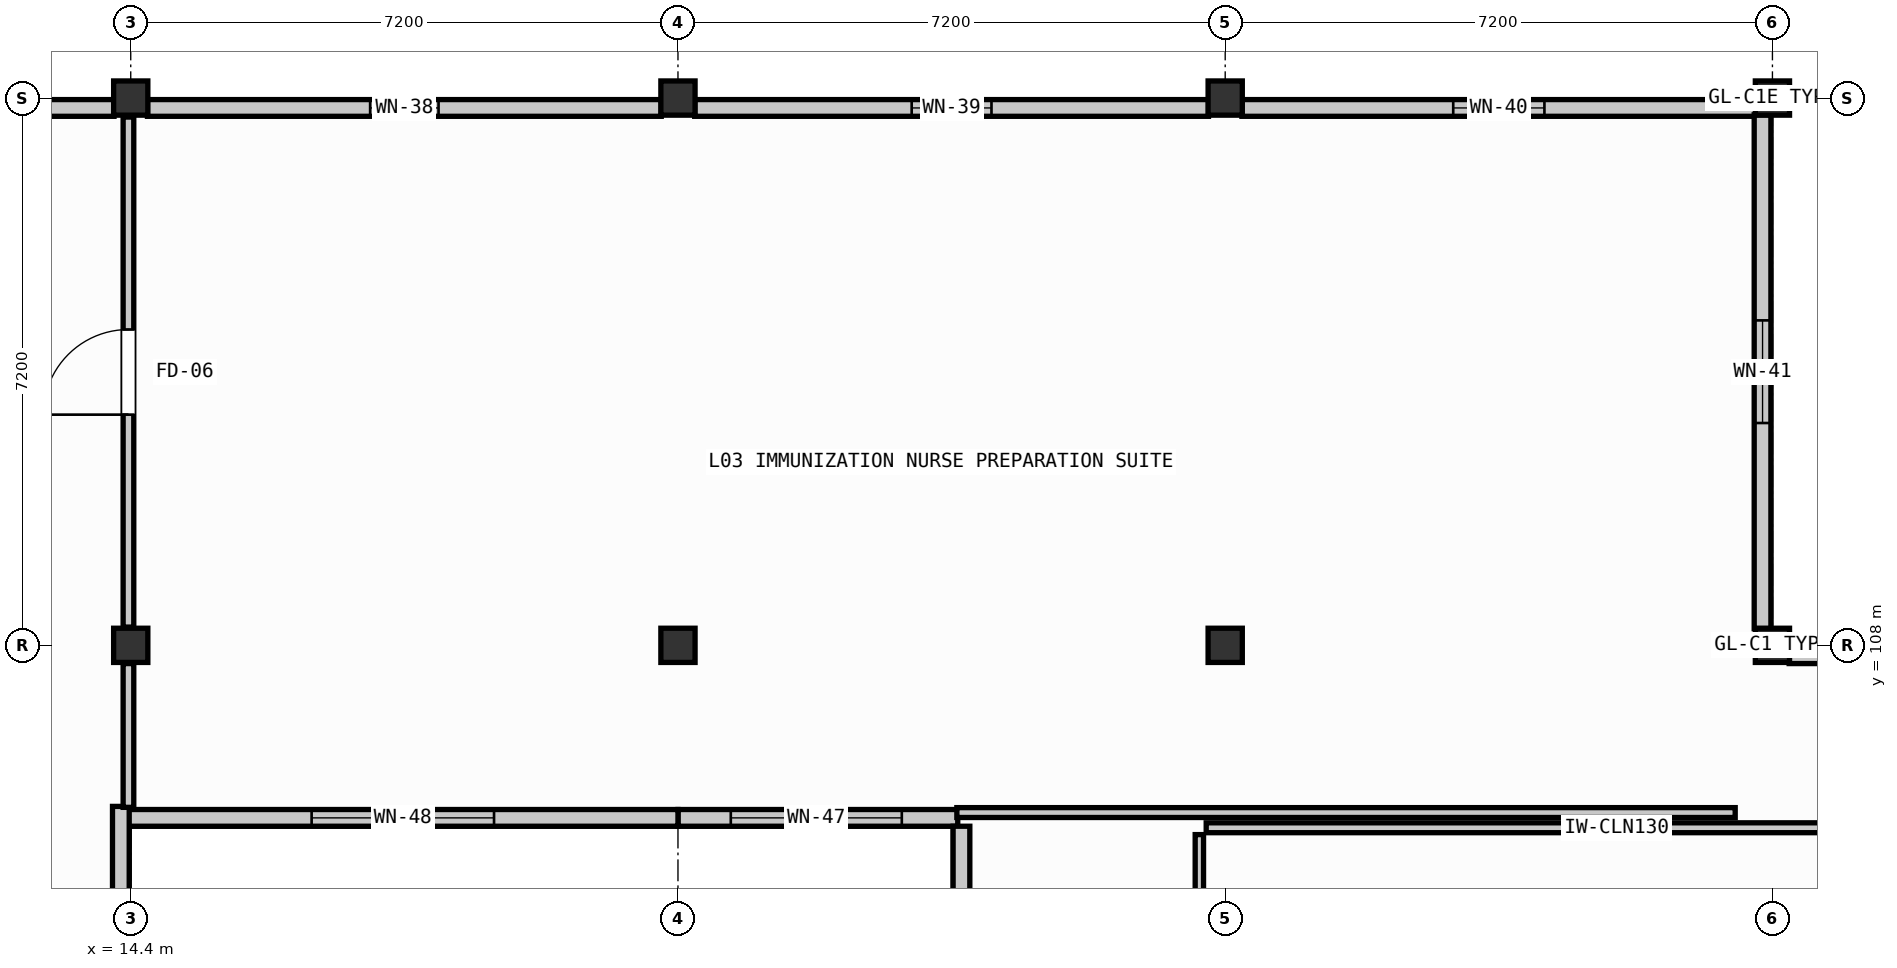
"""IFC4 building model, lengths in metres.
Left out: names, types, materials, properties, quantities, classifications, styles, units other than length and angle.
Written with IfcOpenShell. Run it as: python <this file> out.ifc"""

import sys

from ifc_helpers import new_model, si_unit, direction, frame, frame_2d, origin, origin_2d, place, context, subcontext, project, spatial, rectangle, extrude, element, fill, save


model = new_model("IFC4")
c1 = context("Model", 3, precision=1e-05, world=origin(), true_north=direction((0.0, 1.0)))
c2 = subcontext(c1, "Body", "Model", "MODEL_VIEW")
j1 = project(units=[si_unit("LENGTHUNIT", "METRE"), si_unit("PLANEANGLEUNIT", "RADIAN")], contexts=[c1])
p1 = place(None, origin())
s1 = spatial("IfcSite", under=j1, at=p1, CompositionType="ELEMENT")
p2 = place(p1, origin())
s2 = spatial("IfcBuilding", under=s1, at=p2, CompositionType="ELEMENT")
p3 = place(p2, frame((0.0, 0.0, 9.3)))
s3 = spatial("IfcBuildingStorey", under=s2, at=p3, CompositionType="ELEMENT", Elevation=9.3)
for number, where, z_axis, x_axis in (
    (1, (14.4, 108.0, 0.0), (0.0, 0.0, 1.0), (1.0, 0.0, 0.0)),
    (2, (14.4, 115.2, 0.0), (0.0, 0.0, 1.0), (1.0, 0.0, 0.0)),
    (3, (21.6, 108.0, 0.0), (0.0, 0.0, 1.0), (1.0, 0.0, 0.0)),
    (4, (21.6, 115.2, 0.0), (0.0, 0.0, 1.0), (1.0, 0.0, 0.0)),
    (5, (28.8, 108.0, 0.0), (0.0, 0.0, 1.0), (1.0, 0.0, 0.0)),
    (6, (28.8, 115.2, 0.0), (0.0, 0.0, 1.0), (1.0, 0.0, 0.0)),
    (7, (36.0, 108.0, 0.0), (0.0, 0.0, 1.0), (1.0, 0.0, 0.0)),
    (8, (36.0, 115.2, 0.0), (0.0, 0.0, 1.0), (1.0, 0.0, 0.0)),
):
    element("IfcColumn", number, at=place(p3, frame(where, z_axis=z_axis, x_axis=x_axis)), inside=s3, PredefinedType="COLUMN", context=c2, shape_type="SweptSolid", body=[
        extrude(rectangle(XDim=0.45, YDim=0.45, at=origin_2d()), origin(), (0.0, 0.0, 1.0), 3.99),
    ])
p4 = place(p3, frame((7.42, 115.07, 0.0), z_axis=(0.0, 0.0, 1.0), x_axis=(1.0, 0.0, 0.0)))
e9 = element("IfcWall", 9, at=p4, inside=s3, PredefinedType="SOLIDWALL", context=c2, shape_type="SweptSolid", body=[
    extrude(rectangle(XDim=6.76, YDim=0.22, at=frame_2d((3.38, 0.0))), origin(), (0.0, 0.0, 1.0), 3.35),
])
p5 = place(p4, frame((3.005, 0.0, 0.95)))
e10 = element("IfcOpeningElement", 10, at=p5, cuts=e9, PredefinedType="OPENING", context=c2, shape_type="SweptSolid", body=[
    extrude(rectangle(XDim=0.75, YDim=1.55, at=frame_2d((0.375, 0.775))), frame((0.0, 0.12, 0.0), z_axis=(0.0, -1.0, 0.0), x_axis=(1.0, 0.0, 0.0)), (0.0, 0.0, 1.0), 0.24),
])
p6 = place(p3, frame((14.62, 115.07, 0.0), z_axis=(0.0, 0.0, 1.0), x_axis=(1.0, 0.0, 0.0)))
e11 = element("IfcWall", 11, at=p6, inside=s3, PredefinedType="SOLIDWALL", context=c2, shape_type="SweptSolid", body=[
    extrude(rectangle(XDim=6.76, YDim=0.22, at=frame_2d((3.38, 0.0))), origin(), (0.0, 0.0, 1.0), 3.35),
])
p7 = place(p6, frame((2.93, 0.0, 0.95)))
e12 = element("IfcOpeningElement", 12, at=p7, cuts=e11, PredefinedType="OPENING", context=c2, shape_type="SweptSolid", body=[
    extrude(rectangle(XDim=0.9, YDim=1.55, at=frame_2d((0.45, 0.775))), frame((0.0, 0.12, 0.0), z_axis=(0.0, -1.0, 0.0), x_axis=(1.0, 0.0, 0.0)), (0.0, 0.0, 1.0), 0.24),
])
p8 = place(p3, frame((21.82, 115.07, 0.0), z_axis=(0.0, 0.0, 1.0), x_axis=(1.0, 0.0, 0.0)))
e13 = element("IfcWall", 13, at=p8, inside=s3, PredefinedType="SOLIDWALL", context=c2, shape_type="SweptSolid", body=[
    extrude(rectangle(XDim=6.76, YDim=0.22, at=frame_2d((3.38, 0.0))), origin(), (0.0, 0.0, 1.0), 3.35),
])
p9 = place(p8, frame((2.855, 0.0, 0.95)))
e14 = element("IfcOpeningElement", 14, at=p9, cuts=e13, PredefinedType="OPENING", context=c2, shape_type="SweptSolid", body=[
    extrude(rectangle(XDim=1.05, YDim=1.55, at=frame_2d((0.525, 0.775))), frame((0.0, 0.12, 0.0), z_axis=(0.0, -1.0, 0.0), x_axis=(1.0, 0.0, 0.0)), (0.0, 0.0, 1.0), 0.24),
])
p10 = place(p3, frame((29.02, 115.07, 0.0), z_axis=(0.0, 0.0, 1.0), x_axis=(1.0, 0.0, 0.0)))
e15 = element("IfcWall", 15, at=p10, inside=s3, PredefinedType="SOLIDWALL", context=c2, shape_type="SweptSolid", body=[
    extrude(rectangle(XDim=6.76, YDim=0.22, at=frame_2d((3.38, 0.0))), origin(), (0.0, 0.0, 1.0), 3.35),
])
p11 = place(p10, frame((2.78, 0.0, 0.95)))
e16 = element("IfcOpeningElement", 16, at=p11, cuts=e15, PredefinedType="OPENING", context=c2, shape_type="SweptSolid", body=[
    extrude(rectangle(XDim=1.2, YDim=1.55, at=frame_2d((0.6, 0.775))), frame((0.0, 0.12, 0.0), z_axis=(0.0, -1.0, 0.0), x_axis=(1.0, 0.0, 0.0)), (0.0, 0.0, 1.0), 0.24),
])
p12 = place(p3, frame((35.87, 114.98, 0.0), z_axis=(0.0, 0.0, 1.0), x_axis=(0.0, -1.0, 0.0)))
e17 = element("IfcWall", 17, at=p12, inside=s3, PredefinedType="SOLIDWALL", context=c2, shape_type="SweptSolid", body=[
    extrude(rectangle(XDim=6.76, YDim=0.22, at=frame_2d((3.38, 0.0))), origin(), (0.0, 0.0, 1.0), 3.27),
])
p13 = place(p12, frame((2.705, 0.0, 0.95)))
e18 = element("IfcOpeningElement", 18, at=p13, cuts=e17, PredefinedType="OPENING", context=c2, shape_type="SweptSolid", body=[
    extrude(rectangle(XDim=1.35, YDim=1.55, at=frame_2d((0.675, 0.775))), frame((0.0, 0.12, 0.0), z_axis=(0.0, -1.0, 0.0), x_axis=(1.0, 0.0, 0.0)), (0.0, 0.0, 1.0), 0.24),
])
p14 = place(p3, frame((36.22, 107.87, 0.0), z_axis=(0.0, 0.0, 1.0), x_axis=(1.0, 0.0, 0.0)))
e19 = element("IfcWall", 19, at=p14, inside=s3, PredefinedType="SOLIDWALL", context=c2, shape_type="SweptSolid", body=[
    extrude(rectangle(XDim=3.42, YDim=0.22, at=frame_2d((1.71, 0.0))), origin(), (0.0, 0.0, 1.0), 3.35),
])
p15 = place(p14, frame((0.96, 0.0, 0.95)))
e20 = element("IfcOpeningElement", 20, at=p15, cuts=e19, PredefinedType="OPENING", context=c2, shape_type="SweptSolid", body=[
    extrude(rectangle(XDim=1.5, YDim=1.55, at=frame_2d((0.75, 0.775))), frame((0.0, 0.12, 0.0), z_axis=(0.0, -1.0, 0.0), x_axis=(1.0, 0.0, 0.0)), (0.0, 0.0, 1.0), 0.24),
])
p16 = place(p3, frame((25.281, 105.73, 0.0), z_axis=(0.0, 0.0, 1.0), x_axis=(-1.0, 0.0, 0.0)))
e21 = element("IfcWall", 21, at=p16, inside=s3, PredefinedType="SOLIDWALL", context=c2, shape_type="SweptSolid", body=[
    extrude(rectangle(XDim=3.681, YDim=0.22, at=frame_2d((1.84, 0.0))), origin(), (0.0, 0.0, 1.0), 3.97),
])
p17 = place(p16, frame((0.736, 0.0, 0.95)))
e22 = element("IfcOpeningElement", 22, at=p17, cuts=e21, PredefinedType="OPENING", context=c2, shape_type="SweptSolid", body=[
    extrude(rectangle(XDim=2.25, YDim=1.55, at=frame_2d((1.125, 0.775))), frame((0.0, 0.12, 0.0), z_axis=(0.0, -1.0, 0.0), x_axis=(1.0, 0.0, 0.0)), (0.0, 0.0, 1.0), 0.24),
])
p18 = place(p3, frame((21.6, 105.73, 0.0), z_axis=(0.0, 0.0, 1.0), x_axis=(-1.0, 0.0, 0.0)))
e23 = element("IfcWall", 23, at=p18, inside=s3, PredefinedType="SOLIDWALL", context=c2, shape_type="SweptSolid", body=[
    extrude(rectangle(XDim=7.24, YDim=0.22, at=frame_2d((3.62, 0.0))), origin(), (0.0, 0.0, 1.0), 3.35),
])
p19 = place(p18, frame((2.42, 0.0, 0.95)))
e24 = element("IfcOpeningElement", 24, at=p19, cuts=e23, PredefinedType="OPENING", context=c2, shape_type="SweptSolid", body=[
    extrude(rectangle(XDim=2.4, YDim=1.55, at=frame_2d((1.2, 0.775))), frame((0.0, 0.12, 0.0), z_axis=(0.0, -1.0, 0.0), x_axis=(1.0, 0.0, 0.0)), (0.0, 0.0, 1.0), 0.24),
])
p20 = place(p3, frame((14.27, 105.881, 0.0), z_axis=(0.0, 0.0, 1.0), x_axis=(0.0, -1.0, 0.0)))
e25 = element("IfcWall", 25, at=p20, inside=s3, PredefinedType="SOLIDWALL", context=c2, shape_type="SweptSolid", body=[
    extrude(rectangle(XDim=4.861, YDim=0.22, at=frame_2d((2.431, 0.0))), origin(), (0.0, 0.0, 1.0), 3.27),
])
p21 = place(p20, frame((2.736, 0.0, 0.95)))
e26 = element("IfcOpeningElement", 26, at=p21, cuts=e25, PredefinedType="OPENING", context=c2, shape_type="SweptSolid", body=[
    extrude(rectangle(XDim=0.75, YDim=1.85, at=frame_2d((0.375, 0.925))), frame((0.0, 0.12, 0.0), z_axis=(0.0, -1.0, 0.0), x_axis=(1.0, 0.0, 0.0)), (0.0, 0.0, 1.0), 0.24),
])
p22 = place(p3, frame((25.33, 100.8, 0.0), z_axis=(0.0, 0.0, 1.0), x_axis=(0.0, 1.0, 0.0)))
e27 = element("IfcWall", 27, at=p22, inside=s3, PredefinedType="SOLIDWALL", context=c2, shape_type="SweptSolid", body=[
    extrude(rectangle(XDim=4.82, YDim=0.22, at=frame_2d((2.41, 0.0))), origin(), (0.0, 0.0, 1.0), 3.97),
])
p23 = place(p22, frame((1.81, 0.0, 0.95)))
e28 = element("IfcOpeningElement", 28, at=p23, cuts=e27, PredefinedType="OPENING", context=c2, shape_type="SweptSolid", body=[
    extrude(rectangle(XDim=1.2, YDim=1.85, at=frame_2d((0.6, 0.925))), frame((0.0, 0.12, 0.0), z_axis=(0.0, -1.0, 0.0), x_axis=(1.0, 0.0, 0.0)), (0.0, 0.0, 1.0), 0.24),
])
p24 = place(p3, frame((28.55, 105.6, 0.0), z_axis=(0.0, 0.0, 1.0), x_axis=(1.0, 0.0, 0.0)))
e29 = element("IfcWall", 29, at=p24, inside=s3, PredefinedType="PARTITIONING", context=c2, shape_type="SweptSolid", body=[
    extrude(rectangle(XDim=10.8, YDim=0.13, at=frame_2d((5.4, 0.0))), origin(), (0.0, 0.0, 1.0), 3.35),
])
p25 = place(p3, frame((28.46, 88.1, 0.0), z_axis=(0.0, 0.0, 1.0), x_axis=(0.0, 1.0, 0.0)))
e30 = element("IfcWall", 30, at=p25, inside=s3, PredefinedType="PARTITIONING", context=c2, shape_type="SweptSolid", body=[
    extrude(rectangle(XDim=17.41, YDim=0.11, at=frame_2d((8.705, 0.0))), origin(), (0.0, 0.0, 1.0), 3.97),
])
p26 = place(p3, frame((35.51, 105.8, 0.0), z_axis=(0.0, 0.0, 1.0), x_axis=(-1.0, 0.0, 0.0)))
e31 = element("IfcWall", 31, at=p26, inside=s3, PredefinedType="PARTITIONING", context=c2, shape_type="SweptSolid", body=[
    extrude(rectangle(XDim=10.241, YDim=0.13, at=frame_2d((5.12, 0.0))), origin(), (0.0, 0.0, 1.0), 3.35),
])
p27 = place(p3, frame((14.37, 105.868, 0.0), z_axis=(0.0, 0.0, 1.0), x_axis=(0.0, 1.0, 0.0)))
e32 = element("IfcWall", 32, at=p27, inside=s3, PredefinedType="PARTITIONING", context=c2, shape_type="SweptSolid", body=[
    extrude(rectangle(XDim=1.892, YDim=0.14, at=frame_2d((0.946, 0.0))), origin(), (0.0, 0.0, 1.0), 3.27),
])
p28 = place(p3, frame((14.37, 108.24, 0.0), z_axis=(0.0, 0.0, 1.0), x_axis=(0.0, 1.0, 0.0)))
e33 = element("IfcWall", 33, at=p28, inside=s3, PredefinedType="PARTITIONING", context=c2, shape_type="SweptSolid", body=[
    extrude(rectangle(XDim=6.71, YDim=0.14, at=frame_2d((3.355, 0.0))), origin(), (0.0, 0.0, 1.0), 3.27),
])
p29 = place(p28, frame((2.795, 0.0, 0.0)))
e34 = element("IfcOpeningElement", 34, at=p29, cuts=e33, PredefinedType="OPENING", context=c2, shape_type="SweptSolid", body=[
    extrude(rectangle(XDim=1.12, YDim=2.14, at=frame_2d((0.56, 1.07))), frame((0.0, 0.08, 0.0), z_axis=(0.0, -1.0, 0.0), x_axis=(1.0, 0.0, 0.0)), (0.0, 0.0, 1.0), 0.16),
])
p30 = place(p7, origin())
e35 = element("IfcWindow", 35, at=p30, inside=s3, PartitioningType="SINGLE_PANEL", PredefinedType="WINDOW", context=c2, shape_type="SweptSolid", body=[
    extrude(rectangle(XDim=0.9, YDim=1.55, at=frame_2d((0.45, 0.775))), frame((0.0, 0.03, 0.0), z_axis=(0.0, -1.0, 0.0), x_axis=(1.0, 0.0, 0.0)), (0.0, 0.0, 1.0), 0.06),
])
fill(e12, e35)
p31 = place(p9, origin())
e36 = element("IfcWindow", 36, at=p31, inside=s3, PartitioningType="SINGLE_PANEL", PredefinedType="WINDOW", context=c2, shape_type="SweptSolid", body=[
    extrude(rectangle(XDim=1.05, YDim=1.55, at=frame_2d((0.525, 0.775))), frame((0.0, 0.03, 0.0), z_axis=(0.0, -1.0, 0.0), x_axis=(1.0, 0.0, 0.0)), (0.0, 0.0, 1.0), 0.06),
])
fill(e14, e36)
p32 = place(p11, origin())
e37 = element("IfcWindow", 37, at=p32, inside=s3, PartitioningType="SINGLE_PANEL", PredefinedType="WINDOW", context=c2, shape_type="SweptSolid", body=[
    extrude(rectangle(XDim=1.2, YDim=1.55, at=frame_2d((0.6, 0.775))), frame((0.0, 0.03, 0.0), z_axis=(0.0, -1.0, 0.0), x_axis=(1.0, 0.0, 0.0)), (0.0, 0.0, 1.0), 0.06),
])
fill(e16, e37)
p33 = place(p13, origin())
e38 = element("IfcWindow", 38, at=p33, inside=s3, PartitioningType="SINGLE_PANEL", PredefinedType="WINDOW", context=c2, shape_type="SweptSolid", body=[
    extrude(rectangle(XDim=1.35, YDim=1.55, at=frame_2d((0.675, 0.775))), frame((0.0, 0.03, 0.0), z_axis=(0.0, -1.0, 0.0), x_axis=(1.0, 0.0, 0.0)), (0.0, 0.0, 1.0), 0.06),
])
fill(e18, e38)
p34 = place(p17, origin())
e39 = element("IfcWindow", 39, at=p34, inside=s3, PartitioningType="SINGLE_PANEL", PredefinedType="WINDOW", context=c2, shape_type="SweptSolid", body=[
    extrude(rectangle(XDim=2.25, YDim=1.55, at=frame_2d((1.125, 0.775))), frame((0.0, 0.03, 0.0), z_axis=(0.0, -1.0, 0.0), x_axis=(1.0, 0.0, 0.0)), (0.0, 0.0, 1.0), 0.06),
])
fill(e22, e39)
p35 = place(p19, origin())
e40 = element("IfcWindow", 40, at=p35, inside=s3, PartitioningType="SINGLE_PANEL", PredefinedType="WINDOW", context=c2, shape_type="SweptSolid", body=[
    extrude(rectangle(XDim=2.4, YDim=1.55, at=frame_2d((1.2, 0.775))), frame((0.0, 0.03, 0.0), z_axis=(0.0, -1.0, 0.0), x_axis=(1.0, 0.0, 0.0)), (0.0, 0.0, 1.0), 0.06),
])
fill(e24, e40)
p36 = place(p29, origin())
e41 = element("IfcDoor", 41, at=p36, inside=s3, OperationType="SINGLE_SWING_LEFT", PredefinedType="DOOR", context=c2, shape_type="SweptSolid", body=[
    extrude(rectangle(XDim=1.12, YDim=2.14, at=frame_2d((0.56, 1.07))), frame((0.0, 0.025, 0.0), z_axis=(0.0, -1.0, 0.0), x_axis=(1.0, 0.0, 0.0)), (0.0, 0.0, 1.0), 0.05),
])
fill(e34, e41)
save(model, sys.argv[1])
